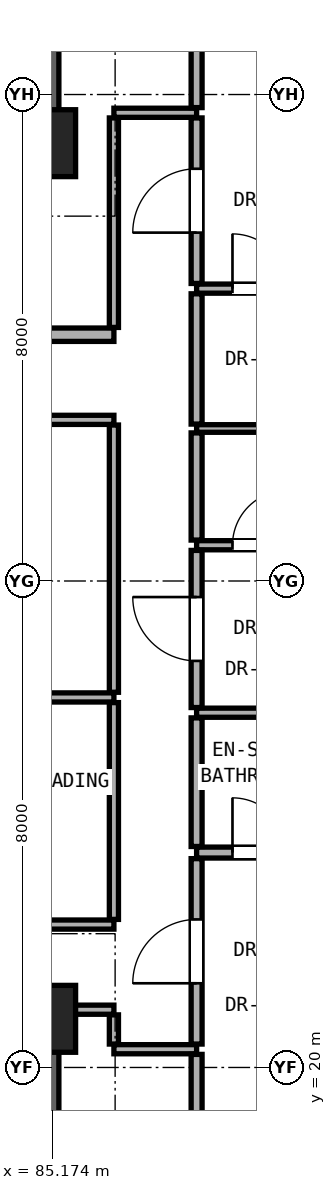
"""IFC4 building model, lengths in metres.
Left out: names, types, materials, properties, quantities, classifications, styles, units other than length and angle.
Written with IfcOpenShell. Run it as: python <this file> out.ifc"""

import sys

from ifc_helpers import new_model, si_unit, direction, frame, frame_2d, origin, origin_2d, place, context, subcontext, project, spatial, rectangle, extrude, element, fill, save


model = new_model("IFC4")
c1 = context("Model", 3, precision=1e-05, world=origin(), true_north=direction((0.0, 1.0)))
c2 = subcontext(c1, "Body", "Model", "MODEL_VIEW")
j1 = project(units=[si_unit("LENGTHUNIT", "METRE"), si_unit("PLANEANGLEUNIT", "RADIAN")], contexts=[c1])
p1 = place(None, origin())
s1 = spatial("IfcSite", under=j1, at=p1, CompositionType="ELEMENT")
p2 = place(p1, origin())
s2 = spatial("IfcBuilding", under=s1, at=p2, CompositionType="ELEMENT")
p3 = place(p2, frame((0.0, 0.0, 144.5)))
s3 = spatial("IfcBuildingStorey", under=s2, at=p3, CompositionType="ELEMENT", Elevation=144.5)
for number, where, z_axis, x_axis in (
    (1, (85.0, 20.8, 0.0), (0.0, 0.0, 1.0), (1.0, 0.0, 0.0)),
    (2, (85.0, 35.2, 0.0), (0.0, 0.0, 1.0), (1.0, 0.0, 0.0)),
):
    element("IfcColumn", number, at=place(p3, frame(where, z_axis=z_axis, x_axis=x_axis)), inside=s3, PredefinedType="COLUMN", context=c2, shape_type="SweptSolid", body=[
        extrude(rectangle(XDim=1.1, YDim=1.1, at=origin_2d()), origin(), (0.0, 0.0, 1.0), 3.3),
    ])
for number, where, z_axis, x_axis in (
    (3, (85.0, 35.2, 0.0), (0.0, 0.0, 1.0), (0.0, 1.0, 0.0)),
    (4, (85.0, 15.2, 0.0), (0.0, 0.0, 1.0), (0.0, 1.0, 0.0)),
):
    element("IfcWall", number, at=place(p3, frame(where, z_axis=z_axis, x_axis=x_axis)), inside=s3, PredefinedType="SHEAR", context=c2, shape_type="SweptSolid", body=[
        extrude(rectangle(XDim=5.6, YDim=0.55, at=frame_2d((2.8, 0.0))), origin(), (0.0, 0.0, 1.0), 2.94),
    ])
p4 = place(p3, frame((86.18, 20.3, 0.0), z_axis=(0.0, 0.0, 1.0), x_axis=(1.0, 0.0, 0.0)))
e5 = element("IfcWall", 5, at=p4, inside=s3, PredefinedType="PARTITIONING", context=c2, shape_type="SweptSolid", body=[
    extrude(rectangle(XDim=1.36, YDim=0.15, at=frame_2d((0.68, 0.0))), origin(), (0.0, 0.0, 1.0), 2.94),
])
p5 = place(p3, frame((85.27, 20.95, 0.0), z_axis=(0.0, 0.0, 1.0), x_axis=(1.0, 0.0, 0.0)))
e6 = element("IfcWall", 6, at=p5, inside=s3, PredefinedType="PARTITIONING", context=c2, shape_type="SweptSolid", body=[
    extrude(rectangle(XDim=0.91, YDim=0.15, at=frame_2d((0.455, 0.0))), origin(), (0.0, 0.0, 1.0), 2.332),
])
p6 = place(p3, frame((66.68, 22.35, 0.0), z_axis=(0.0, 0.0, 1.0), x_axis=(1.0, 0.0, 0.0)))
e7 = element("IfcWall", 7, at=p6, inside=s3, PredefinedType="PARTITIONING", context=c2, shape_type="SweptSolid", body=[
    extrude(rectangle(XDim=19.5, YDim=0.15, at=frame_2d((9.75, 0.0))), origin(), (0.0, 0.0, 1.0), 2.316),
])
p7 = place(p6, frame((8.802, 0.0, 0.0)))
e8 = element("IfcOpeningElement", 8, at=p7, cuts=e7, PredefinedType="OPENING", context=c2, shape_type="SweptSolid", body=[
    extrude(rectangle(XDim=1.05, YDim=2.2, at=frame_2d((0.525, 1.1))), frame((0.0, 0.085, 0.0), z_axis=(0.0, -1.0, 0.0), x_axis=(1.0, 0.0, 0.0)), (0.0, 0.0, 1.0), 0.17),
])
p8 = place(p6, frame((15.846, 0.0, 0.0)))
e9 = element("IfcOpeningElement", 9, at=p8, cuts=e7, PredefinedType="OPENING", context=c2, shape_type="SweptSolid", body=[
    extrude(rectangle(XDim=1.05, YDim=2.2, at=frame_2d((0.525, 1.1))), frame((0.0, 0.085, 0.0), z_axis=(0.0, -1.0, 0.0), x_axis=(1.0, 0.0, 0.0)), (0.0, 0.0, 1.0), 0.17),
])
p9 = place(p3, frame((87.54, 23.534, 0.0), z_axis=(0.0, 0.0, 1.0), x_axis=(1.0, 0.0, 0.0)))
e10 = element("IfcWall", 10, at=p9, inside=s3, PredefinedType="PARTITIONING", context=c2, shape_type="SweptSolid", body=[
    extrude(rectangle(XDim=7.709, YDim=0.18, at=frame_2d((3.854, 0.0))), origin(), (0.0, 0.0, 1.0), 2.159),
])
p10 = place(p9, frame((4.429, 0.0, 0.0)))
e11 = element("IfcOpeningElement", 11, at=p10, cuts=e10, PredefinedType="OPENING", context=c2, shape_type="SweptSolid", body=[
    extrude(rectangle(XDim=0.85, YDim=2.01, at=frame_2d((0.425, 1.005))), frame((0.0, 0.1, 0.0), z_axis=(0.0, -1.0, 0.0), x_axis=(1.0, 0.0, 0.0)), (0.0, 0.0, 1.0), 0.2),
])
p11 = place(p9, frame((0.59, 0.0, 0.0)))
e12 = element("IfcOpeningElement", 12, at=p11, cuts=e10, PredefinedType="OPENING", context=c2, shape_type="SweptSolid", body=[
    extrude(rectangle(XDim=0.9, YDim=2.1, at=frame_2d((0.45, 1.05))), frame((0.0, 0.1, 0.0), z_axis=(0.0, -1.0, 0.0), x_axis=(1.0, 0.0, 0.0)), (0.0, 0.0, 1.0), 0.2),
])
p12 = place(p3, frame((87.54, 25.834, 0.0), z_axis=(0.0, 0.0, 1.0), x_axis=(1.0, 0.0, 0.0)))
e13 = element("IfcWall", 13, at=p12, inside=s3, PredefinedType="PARTITIONING", context=c2, shape_type="SweptSolid", body=[
    extrude(rectangle(XDim=7.709, YDim=0.15, at=frame_2d((3.854, 0.0))), origin(), (0.0, 0.0, 1.0), 2.159),
])
p13 = place(p3, frame((72.05, 26.085, 0.0), z_axis=(0.0, 0.0, 1.0), x_axis=(1.0, 0.0, 0.0)))
e14 = element("IfcWall", 14, at=p13, inside=s3, PredefinedType="PARTITIONING", context=c2, shape_type="SweptSolid", body=[
    extrude(rectangle(XDim=14.13, YDim=0.15, at=frame_2d((7.065, 0.0))), origin(), (0.0, 0.0, 1.0), 2.316),
])
p14 = place(p3, frame((87.54, 28.588, 0.0), z_axis=(0.0, 0.0, 1.0), x_axis=(1.0, 0.0, 0.0)))
e15 = element("IfcWall", 15, at=p14, inside=s3, PredefinedType="PARTITIONING", context=c2, shape_type="SweptSolid", body=[
    extrude(rectangle(XDim=7.709, YDim=0.15, at=frame_2d((3.854, 0.0))), origin(), (0.0, 0.0, 1.0), 2.159),
])
p15 = place(p14, frame((4.429, 0.0, 0.0)))
e16 = element("IfcOpeningElement", 16, at=p15, cuts=e15, PredefinedType="OPENING", context=c2, shape_type="SweptSolid", body=[
    extrude(rectangle(XDim=0.85, YDim=2.01, at=frame_2d((0.425, 1.005))), frame((0.0, 0.085, 0.0), z_axis=(0.0, -1.0, 0.0), x_axis=(1.0, 0.0, 0.0)), (0.0, 0.0, 1.0), 0.17),
])
p16 = place(p14, frame((0.59, 0.0, 0.0)))
e17 = element("IfcOpeningElement", 17, at=p16, cuts=e15, PredefinedType="OPENING", context=c2, shape_type="SweptSolid", body=[
    extrude(rectangle(XDim=0.9, YDim=2.1, at=frame_2d((0.45, 1.05))), frame((0.0, 0.085, 0.0), z_axis=(0.0, -1.0, 0.0), x_axis=(1.0, 0.0, 0.0)), (0.0, 0.0, 1.0), 0.17),
])
p17 = place(p3, frame((66.68, 30.65, 0.0), z_axis=(0.0, 0.0, 1.0), x_axis=(1.0, 0.0, 0.0)))
e18 = element("IfcWall", 18, at=p17, inside=s3, PredefinedType="PARTITIONING", context=c2, shape_type="SweptSolid", body=[
    extrude(rectangle(XDim=19.5, YDim=0.15, at=frame_2d((9.75, 0.0))), origin(), (0.0, 0.0, 1.0), 2.316),
])
p18 = place(p17, frame((3.745, 0.0, 0.0)))
e19 = element("IfcOpeningElement", 19, at=p18, cuts=e18, PredefinedType="OPENING", context=c2, shape_type="SweptSolid", body=[
    extrude(rectangle(XDim=0.95, YDim=2.15, at=frame_2d((0.475, 1.075))), frame((0.0, 0.085, 0.0), z_axis=(0.0, -1.0, 0.0), x_axis=(1.0, 0.0, 0.0)), (0.0, 0.0, 1.0), 0.17),
])
p19 = place(p17, frame((8.802, 0.0, 0.0)))
e20 = element("IfcOpeningElement", 20, at=p19, cuts=e18, PredefinedType="OPENING", context=c2, shape_type="SweptSolid", body=[
    extrude(rectangle(XDim=1.05, YDim=2.2, at=frame_2d((0.525, 1.1))), frame((0.0, 0.085, 0.0), z_axis=(0.0, -1.0, 0.0), x_axis=(1.0, 0.0, 0.0)), (0.0, 0.0, 1.0), 0.17),
])
p20 = place(p17, frame((15.846, 0.0, 0.0)))
e21 = element("IfcOpeningElement", 21, at=p20, cuts=e18, PredefinedType="OPENING", context=c2, shape_type="SweptSolid", body=[
    extrude(rectangle(XDim=1.05, YDim=2.2, at=frame_2d((0.525, 1.1))), frame((0.0, 0.085, 0.0), z_axis=(0.0, -1.0, 0.0), x_axis=(1.0, 0.0, 0.0)), (0.0, 0.0, 1.0), 0.17),
])
p21 = place(p3, frame((87.54, 30.508, 0.0), z_axis=(0.0, 0.0, 1.0), x_axis=(1.0, 0.0, 0.0)))
e22 = element("IfcWall", 22, at=p21, inside=s3, PredefinedType="PARTITIONING", context=c2, shape_type="SweptSolid", body=[
    extrude(rectangle(XDim=7.709, YDim=0.125, at=frame_2d((3.854, 0.0))), origin(), (0.0, 0.0, 1.0), 2.159),
])
p22 = place(p3, frame((71.55, 32.05, 0.0), z_axis=(0.0, 0.0, 1.0), x_axis=(1.0, 0.0, 0.0)))
e23 = element("IfcWall", 23, at=p22, inside=s3, PredefinedType="SOLIDWALL", context=c2, shape_type="SweptSolid", body=[
    extrude(rectangle(XDim=14.63, YDim=0.22, at=frame_2d((7.315, 0.0))), origin(), (0.0, 0.0, 1.0), 2.316),
])
p23 = place(p22, frame((5.89, 0.0, 0.0)))
e24 = element("IfcOpeningElement", 24, at=p23, cuts=e23, PredefinedType="OPENING", context=c2, shape_type="SweptSolid", body=[
    extrude(rectangle(XDim=1.2, YDim=2.25, at=frame_2d((0.6, 1.125))), frame((0.0, 0.12, 0.0), z_axis=(0.0, -1.0, 0.0), x_axis=(1.0, 0.0, 0.0)), (0.0, 0.0, 1.0), 0.24),
])
p24 = place(p22, frame((10.535, 0.0, 0.0)))
e25 = element("IfcOpeningElement", 25, at=p24, cuts=e23, PredefinedType="OPENING", context=c2, shape_type="SweptSolid", body=[
    extrude(rectangle(XDim=0.95, YDim=2.15, at=frame_2d((0.475, 1.075))), frame((0.0, 0.12, 0.0), z_axis=(0.0, -1.0, 0.0), x_axis=(1.0, 0.0, 0.0)), (0.0, 0.0, 1.0), 0.24),
])
p25 = place(p22, frame((0.7, 0.0, 0.0)))
e26 = element("IfcOpeningElement", 26, at=p25, cuts=e23, PredefinedType="OPENING", context=c2, shape_type="SweptSolid", body=[
    extrude(rectangle(XDim=0.85, YDim=2.01, at=frame_2d((0.425, 1.005))), frame((0.0, 0.12, 0.0), z_axis=(0.0, -1.0, 0.0), x_axis=(1.0, 0.0, 0.0)), (0.0, 0.0, 1.0), 0.24),
])
p26 = place(p22, frame((2.55, 0.0, 0.0)))
e27 = element("IfcOpeningElement", 27, at=p26, cuts=e23, PredefinedType="OPENING", context=c2, shape_type="SweptSolid", body=[
    extrude(rectangle(XDim=0.85, YDim=2.01, at=frame_2d((0.425, 1.005))), frame((0.0, 0.12, 0.0), z_axis=(0.0, -1.0, 0.0), x_axis=(1.0, 0.0, 0.0)), (0.0, 0.0, 1.0), 0.24),
])
p27 = place(p3, frame((87.54, 32.808, 0.0), z_axis=(0.0, 0.0, 1.0), x_axis=(1.0, 0.0, 0.0)))
e28 = element("IfcWall", 28, at=p27, inside=s3, PredefinedType="PARTITIONING", context=c2, shape_type="SweptSolid", body=[
    extrude(rectangle(XDim=7.709, YDim=0.15, at=frame_2d((3.854, 0.0))), origin(), (0.0, 0.0, 1.0), 2.159),
])
p28 = place(p27, frame((4.429, 0.0, 0.0)))
e29 = element("IfcOpeningElement", 29, at=p28, cuts=e28, PredefinedType="OPENING", context=c2, shape_type="SweptSolid", body=[
    extrude(rectangle(XDim=0.85, YDim=2.01, at=frame_2d((0.425, 1.005))), frame((0.0, 0.085, 0.0), z_axis=(0.0, -1.0, 0.0), x_axis=(1.0, 0.0, 0.0)), (0.0, 0.0, 1.0), 0.17),
])
p29 = place(p27, frame((0.59, 0.0, 0.0)))
e30 = element("IfcOpeningElement", 30, at=p29, cuts=e28, PredefinedType="OPENING", context=c2, shape_type="SweptSolid", body=[
    extrude(rectangle(XDim=0.9, YDim=2.1, at=frame_2d((0.45, 1.05))), frame((0.0, 0.085, 0.0), z_axis=(0.0, -1.0, 0.0), x_axis=(1.0, 0.0, 0.0)), (0.0, 0.0, 1.0), 0.17),
])
p30 = place(p3, frame((86.18, 35.7, 0.0), z_axis=(0.0, 0.0, 1.0), x_axis=(1.0, 0.0, 0.0)))
e31 = element("IfcWall", 31, at=p30, inside=s3, PredefinedType="PARTITIONING", context=c2, shape_type="SweptSolid", body=[
    extrude(rectangle(XDim=1.36, YDim=0.15, at=frame_2d((0.68, 0.0))), origin(), (0.0, 0.0, 1.0), 2.94),
])
p31 = place(p3, frame((86.18, 20.385, 0.0), z_axis=(0.0, 0.0, 1.0), x_axis=(0.0, 1.0, 0.0)))
e32 = element("IfcWall", 32, at=p31, inside=s3, PredefinedType="PARTITIONING", context=c2, shape_type="SweptSolid", body=[
    extrude(rectangle(XDim=0.48, YDim=0.15, at=frame_2d((0.24, 0.0))), origin(), (0.0, 0.0, 1.0), 2.332),
])
p32 = place(p3, frame((86.18, 22.435, 0.0), z_axis=(0.0, 0.0, 1.0), x_axis=(0.0, 1.0, 0.0)))
e33 = element("IfcWall", 33, at=p32, inside=s3, PredefinedType="PARTITIONING", context=c2, shape_type="SweptSolid", body=[
    extrude(rectangle(XDim=3.565, YDim=0.15, at=frame_2d((1.782, 0.0))), origin(), (0.0, 0.0, 1.0), 2.94),
])
p33 = place(p3, frame((86.18, 26.17, 0.0), z_axis=(0.0, 0.0, 1.0), x_axis=(0.0, 1.0, 0.0)))
e34 = element("IfcWall", 34, at=p33, inside=s3, PredefinedType="PARTITIONING", context=c2, shape_type="SweptSolid", body=[
    extrude(rectangle(XDim=4.395, YDim=0.15, at=frame_2d((2.198, 0.0))), origin(), (0.0, 0.0, 1.0), 2.316),
])
p34 = place(p3, frame((86.18, 32.17, 0.0), z_axis=(0.0, 0.0, 1.0), x_axis=(0.0, 1.0, 0.0)))
e35 = element("IfcWall", 35, at=p34, inside=s3, PredefinedType="PARTITIONING", context=c2, shape_type="SweptSolid", body=[
    extrude(rectangle(XDim=3.445, YDim=0.15, at=frame_2d((1.723, 0.0))), origin(), (0.0, 0.0, 1.0), 2.332),
])
p35 = place(p3, frame((87.54, 16.501, 0.0), z_axis=(0.0, 0.0, 1.0), x_axis=(0.0, 1.0, 0.0)))
e36 = element("IfcWall", 36, at=p35, inside=s3, PredefinedType="PARTITIONING", context=c2, shape_type="SweptSolid", body=[
    extrude(rectangle(XDim=3.714, YDim=0.18, at=frame_2d((1.857, 0.0))), origin(), (0.0, 0.0, 1.0), 2.383),
])
p36 = place(p3, frame((87.54, 20.385, 0.0), z_axis=(0.0, 0.0, 1.0), x_axis=(0.0, 1.0, 0.0)))
e37 = element("IfcWall", 37, at=p36, inside=s3, PredefinedType="PARTITIONING", context=c2, shape_type="SweptSolid", body=[
    extrude(rectangle(XDim=3.049, YDim=0.18, at=frame_2d((1.524, 0.0))), origin(), (0.0, 0.0, 1.0), 2.332),
])
p37 = place(p36, frame((1.0, 0.0, 0.0)))
e38 = element("IfcOpeningElement", 38, at=p37, cuts=e37, PredefinedType="OPENING", context=c2, shape_type="SweptSolid", body=[
    extrude(rectangle(XDim=1.05, YDim=2.2, at=frame_2d((0.525, 1.1))), frame((0.0, 0.1, 0.0), z_axis=(0.0, -1.0, 0.0), x_axis=(1.0, 0.0, 0.0)), (0.0, 0.0, 1.0), 0.2),
])
p38 = place(p3, frame((87.54, 23.634, 0.0), z_axis=(0.0, 0.0, 1.0), x_axis=(0.0, 1.0, 0.0)))
e39 = element("IfcWall", 39, at=p38, inside=s3, PredefinedType="PARTITIONING", context=c2, shape_type="SweptSolid", body=[
    extrude(rectangle(XDim=2.115, YDim=0.18, at=frame_2d((1.058, 0.0))), origin(), (0.0, 0.0, 1.0), 2.94),
])
p39 = place(p3, frame((87.54, 25.919, 0.0), z_axis=(0.0, 0.0, 1.0), x_axis=(0.0, 1.0, 0.0)))
e40 = element("IfcWall", 40, at=p39, inside=s3, PredefinedType="PARTITIONING", context=c2, shape_type="SweptSolid", body=[
    extrude(rectangle(XDim=2.584, YDim=0.18, at=frame_2d((1.292, 0.0))), origin(), (0.0, 0.0, 1.0), 2.316),
])
p40 = place(p39, frame((0.767, 0.0, 0.0)))
e41 = element("IfcOpeningElement", 41, at=p40, cuts=e40, PredefinedType="OPENING", context=c2, shape_type="SweptSolid", body=[
    extrude(rectangle(XDim=1.05, YDim=2.2, at=frame_2d((0.525, 1.1))), frame((0.0, 0.1, 0.0), z_axis=(0.0, -1.0, 0.0), x_axis=(1.0, 0.0, 0.0)), (0.0, 0.0, 1.0), 0.2),
])
p41 = place(p3, frame((87.54, 28.673, 0.0), z_axis=(0.0, 0.0, 1.0), x_axis=(0.0, 1.0, 0.0)))
e42 = element("IfcWall", 42, at=p41, inside=s3, PredefinedType="PARTITIONING", context=c2, shape_type="SweptSolid", body=[
    extrude(rectangle(XDim=1.762, YDim=0.18, at=frame_2d((0.881, 0.0))), origin(), (0.0, 0.0, 1.0), 2.94),
])
p42 = place(p3, frame((87.54, 30.581, 0.0), z_axis=(0.0, 0.0, 1.0), x_axis=(0.0, 1.0, 0.0)))
e43 = element("IfcWall", 43, at=p42, inside=s3, PredefinedType="PARTITIONING", context=c2, shape_type="SweptSolid", body=[
    extrude(rectangle(XDim=2.142, YDim=0.18, at=frame_2d((1.071, 0.0))), origin(), (0.0, 0.0, 1.0), 2.94),
])
p43 = place(p3, frame((87.54, 32.893, 0.0), z_axis=(0.0, 0.0, 1.0), x_axis=(0.0, 1.0, 0.0)))
e44 = element("IfcWall", 44, at=p43, inside=s3, PredefinedType="PARTITIONING", context=c2, shape_type="SweptSolid", body=[
    extrude(rectangle(XDim=2.722, YDim=0.18, at=frame_2d((1.361, 0.0))), origin(), (0.0, 0.0, 1.0), 2.332),
])
p44 = place(p43, frame((0.836, 0.0, 0.0)))
e45 = element("IfcOpeningElement", 45, at=p44, cuts=e44, PredefinedType="OPENING", context=c2, shape_type="SweptSolid", body=[
    extrude(rectangle(XDim=1.05, YDim=2.2, at=frame_2d((0.525, 1.1))), frame((0.0, 0.1, 0.0), z_axis=(0.0, -1.0, 0.0), x_axis=(1.0, 0.0, 0.0)), (0.0, 0.0, 1.0), 0.2),
])
p45 = place(p3, frame((87.54, 35.785, 0.0), z_axis=(0.0, 0.0, 1.0), x_axis=(0.0, 1.0, 0.0)))
e46 = element("IfcWall", 46, at=p45, inside=s3, PredefinedType="PARTITIONING", context=c2, shape_type="SweptSolid", body=[
    extrude(rectangle(XDim=3.729, YDim=0.18, at=frame_2d((1.865, 0.0))), origin(), (0.0, 0.0, 1.0), 2.383),
])
p46 = place(p37, origin())
e47 = element("IfcDoor", 47, at=p46, inside=s3, OperationType="SINGLE_SWING_LEFT", PredefinedType="DOOR", context=c2, shape_type="SweptSolid", body=[
    extrude(rectangle(XDim=1.05, YDim=2.2, at=frame_2d((0.525, 1.1))), frame((0.0, 0.025, 0.0), z_axis=(0.0, -1.0, 0.0), x_axis=(1.0, 0.0, 0.0)), (0.0, 0.0, 1.0), 0.05),
])
fill(e38, e47)
p47 = place(p11, origin())
e48 = element("IfcDoor", 48, at=p47, inside=s3, OperationType="SINGLE_SWING_LEFT", PredefinedType="DOOR", context=c2, shape_type="SweptSolid", body=[
    extrude(rectangle(XDim=0.9, YDim=2.1, at=frame_2d((0.45, 1.05))), frame((0.0, 0.025, 0.0), z_axis=(0.0, -1.0, 0.0), x_axis=(1.0, 0.0, 0.0)), (0.0, 0.0, 1.0), 0.05),
])
fill(e12, e48)
p48 = place(p40, origin())
e49 = element("IfcDoor", 49, at=p48, inside=s3, OperationType="SINGLE_SWING_RIGHT", PredefinedType="DOOR", context=c2, shape_type="SweptSolid", body=[
    extrude(rectangle(XDim=1.05, YDim=2.2, at=frame_2d((0.525, 1.1))), frame((0.0, 0.025, 0.0), z_axis=(0.0, -1.0, 0.0), x_axis=(1.0, 0.0, 0.0)), (0.0, 0.0, 1.0), 0.05),
])
fill(e41, e49)
p49 = place(p16, origin())
e50 = element("IfcDoor", 50, at=p49, inside=s3, OperationType="SINGLE_SWING_RIGHT", PredefinedType="DOOR", context=c2, shape_type="SweptSolid", body=[
    extrude(rectangle(XDim=0.9, YDim=2.1, at=frame_2d((0.45, 1.05))), frame((0.0, 0.025, 0.0), z_axis=(0.0, -1.0, 0.0), x_axis=(1.0, 0.0, 0.0)), (0.0, 0.0, 1.0), 0.05),
])
fill(e17, e50)
p50 = place(p44, origin())
e51 = element("IfcDoor", 51, at=p50, inside=s3, OperationType="SINGLE_SWING_LEFT", PredefinedType="DOOR", context=c2, shape_type="SweptSolid", body=[
    extrude(rectangle(XDim=1.05, YDim=2.2, at=frame_2d((0.525, 1.1))), frame((0.0, 0.025, 0.0), z_axis=(0.0, -1.0, 0.0), x_axis=(1.0, 0.0, 0.0)), (0.0, 0.0, 1.0), 0.05),
])
fill(e45, e51)
p51 = place(p29, origin())
e52 = element("IfcDoor", 52, at=p51, inside=s3, OperationType="SINGLE_SWING_LEFT", PredefinedType="DOOR", context=c2, shape_type="SweptSolid", body=[
    extrude(rectangle(XDim=0.9, YDim=2.1, at=frame_2d((0.45, 1.05))), frame((0.0, 0.025, 0.0), z_axis=(0.0, -1.0, 0.0), x_axis=(1.0, 0.0, 0.0)), (0.0, 0.0, 1.0), 0.05),
])
fill(e30, e52)
save(model, sys.argv[1])
